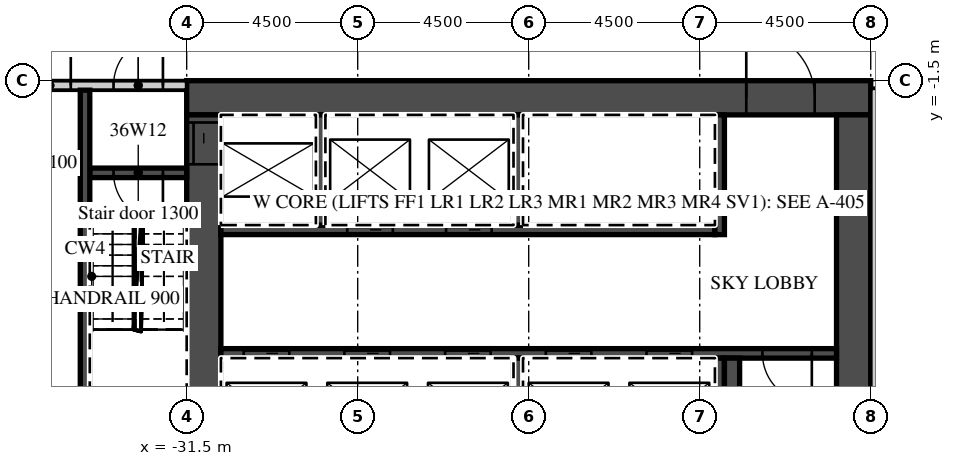
"""IFC4 building model, lengths in metres.
Left out: names, types, materials, properties, quantities, classifications, styles, units other than length and angle.
Written with IfcOpenShell. Run it as: python <this file> out.ifc"""

import sys

from ifc_helpers import new_model, si_unit, direction, frame, frame_2d, origin, place, context, subcontext, project, spatial, rectangle, extrude, element, fill, save


model = new_model("IFC4")
c1 = context("Model", 3, precision=1e-05, world=origin(), true_north=direction((0.0, 1.0)))
c2 = subcontext(c1, "Body", "Model", "MODEL_VIEW")
j1 = project(units=[si_unit("LENGTHUNIT", "METRE"), si_unit("PLANEANGLEUNIT", "RADIAN")], contexts=[c1])
p1 = place(None, origin())
s1 = spatial("IfcSite", under=j1, at=p1, CompositionType="ELEMENT")
p2 = place(p1, origin())
s2 = spatial("IfcBuilding", under=s1, at=p2, CompositionType="ELEMENT")
p3 = place(p2, frame((0.0, 0.0, 155.0)))
s3 = spatial("IfcBuildingStorey", under=s2, at=p3, CompositionType="ELEMENT", Elevation=155.0)
p4 = place(p3, frame((-31.5, -1.95, 0.0), z_axis=(0.0, 0.0, 1.0), x_axis=(1.0, 0.0, 0.0)))
e1 = element("IfcWall", 1, at=p4, inside=s3, PredefinedType="SHEAR", context=c2, shape_type="SweptSolid", body=[
    extrude(rectangle(XDim=18.0, YDim=0.9, at=frame_2d((9.0, 0.0))), origin(), (0.0, 0.0, 1.0), 7.0),
])
p5 = place(p4, frame((14.725, 0.0, 0.0)))
e2 = element("IfcOpeningElement", 2, at=p5, cuts=e1, PredefinedType="OPENING", context=c2, shape_type="SweptSolid", body=[
    extrude(rectangle(XDim=1.8, YDim=2.1, at=frame_2d((0.9, 1.05))), frame((0.0, 0.46, 0.0), z_axis=(0.0, -1.0, 0.0), x_axis=(1.0, 0.0, 0.0)), (0.0, 0.0, 1.0), 0.92),
])
p6 = place(p3, frame((-31.05, -15.2, 0.0), z_axis=(0.0, 0.0, 1.0), x_axis=(0.0, 1.0, 0.0)))
e3 = element("IfcWall", 3, at=p6, inside=s3, PredefinedType="SHEAR", context=c2, shape_type="SweptSolid", body=[
    extrude(rectangle(XDim=12.8, YDim=0.9, at=frame_2d((6.4, 0.0))), origin(), (0.0, 0.0, 1.0), 7.0),
])
p7 = place(p6, frame((11.5, 0.0, 0.0)))
e4 = element("IfcOpeningElement", 4, at=p7, cuts=e3, PredefinedType="OPENING", context=c2, shape_type="SweptSolid", body=[
    extrude(rectangle(XDim=1.1, YDim=2.1, at=frame_2d((0.55, 1.05))), frame((0.0, 0.46, 0.0), z_axis=(0.0, -1.0, 0.0), x_axis=(1.0, 0.0, 0.0)), (0.0, 0.0, 1.0), 0.92),
])
p8 = place(p3, frame((-13.95, -14.6, 0.0), z_axis=(0.0, 0.0, 1.0), x_axis=(0.0, 1.0, 0.0)))
e5 = element("IfcWall", 5, at=p8, inside=s3, PredefinedType="SHEAR", context=c2, shape_type="SweptSolid", body=[
    extrude(rectangle(XDim=12.2, YDim=0.9, at=frame_2d((6.1, 0.0))), origin(), (0.0, 0.0, 1.0), 7.0),
])
p9 = place(p3, frame((-30.6, -5.425, 0.0), z_axis=(0.0, 0.0, 1.0), x_axis=(1.0, 0.0, 0.0)))
e6 = element("IfcWall", 6, at=p9, inside=s3, PredefinedType="SHEAR", context=c2, shape_type="SweptSolid", body=[
    extrude(rectangle(XDim=13.0, YDim=0.25, at=frame_2d((6.5, 0.0))), origin(), (0.0, 0.0, 1.0), 7.0),
])
p10 = place(p9, frame((3.325, 0.0, 0.0)))
e7 = element("IfcOpeningElement", 7, at=p10, cuts=e6, PredefinedType="OPENING", context=c2, shape_type="SweptSolid", body=[
    extrude(rectangle(XDim=1.2, YDim=2.1, at=frame_2d((0.6, 1.05))), frame((0.0, 0.135, 0.0), z_axis=(0.0, -1.0, 0.0), x_axis=(1.0, 0.0, 0.0)), (0.0, 0.0, 1.0), 0.27),
])
p11 = place(p9, frame((5.925, 0.0, 0.0)))
e8 = element("IfcOpeningElement", 8, at=p11, cuts=e6, PredefinedType="OPENING", context=c2, shape_type="SweptSolid", body=[
    extrude(rectangle(XDim=1.2, YDim=2.1, at=frame_2d((0.6, 1.05))), frame((0.0, 0.135, 0.0), z_axis=(0.0, -1.0, 0.0), x_axis=(1.0, 0.0, 0.0)), (0.0, 0.0, 1.0), 0.27),
])
p12 = place(p3, frame((-17.475, -5.55, 0.0), z_axis=(0.0, 0.0, 1.0), x_axis=(0.0, 1.0, 0.0)))
e9 = element("IfcWall", 9, at=p12, inside=s3, PredefinedType="SHEAR", context=c2, shape_type="SweptSolid", body=[
    extrude(rectangle(XDim=3.15, YDim=0.25, at=frame_2d((1.575, 0.0))), origin(), (0.0, 0.0, 1.0), 7.0),
])
for number, where, z_axis, x_axis in (
    (10, (-27.975, -5.3, 0.0), (0.0, 0.0, 1.0), (0.0, 1.0, 0.0)),
    (11, (-22.775, -5.3, 0.0), (0.0, 0.0, 1.0), (0.0, 1.0, 0.0)),
):
    element("IfcWall", number, at=place(p3, frame(where, z_axis=z_axis, x_axis=x_axis)), inside=s3, PredefinedType="SHEAR", context=c2, shape_type="SweptSolid", body=[
        extrude(rectangle(XDim=2.9, YDim=0.25, at=frame_2d((1.45, 0.0))), origin(), (0.0, 0.0, 1.0), 7.0),
    ])
p13 = place(p3, frame((-30.6, -8.675, 0.0), z_axis=(0.0, 0.0, 1.0), x_axis=(1.0, 0.0, 0.0)))
e12 = element("IfcWall", 12, at=p13, inside=s3, PredefinedType="SHEAR", context=c2, shape_type="SweptSolid", body=[
    extrude(rectangle(XDim=16.2, YDim=0.25, at=frame_2d((8.1, 0.0))), origin(), (0.0, 0.0, 1.0), 7.0),
])
p14 = place(p13, frame((0.6, 0.0, 0.0)))
e13 = element("IfcOpeningElement", 13, at=p14, cuts=e12, PredefinedType="OPENING", context=c2, shape_type="SweptSolid", body=[
    extrude(rectangle(XDim=1.2, YDim=2.1, at=frame_2d((0.6, 1.05))), frame((0.0, 0.135, 0.0), z_axis=(0.0, -1.0, 0.0), x_axis=(1.0, 0.0, 0.0)), (0.0, 0.0, 1.0), 0.27),
])
p15 = place(p13, frame((3.25, 0.0, 0.0)))
e14 = element("IfcOpeningElement", 14, at=p15, cuts=e12, PredefinedType="OPENING", context=c2, shape_type="SweptSolid", body=[
    extrude(rectangle(XDim=1.2, YDim=2.1, at=frame_2d((0.6, 1.05))), frame((0.0, 0.135, 0.0), z_axis=(0.0, -1.0, 0.0), x_axis=(1.0, 0.0, 0.0)), (0.0, 0.0, 1.0), 0.27),
])
p16 = place(p13, frame((5.9, 0.0, 0.0)))
e15 = element("IfcOpeningElement", 15, at=p16, cuts=e12, PredefinedType="OPENING", context=c2, shape_type="SweptSolid", body=[
    extrude(rectangle(XDim=1.2, YDim=2.1, at=frame_2d((0.6, 1.05))), frame((0.0, 0.135, 0.0), z_axis=(0.0, -1.0, 0.0), x_axis=(1.0, 0.0, 0.0)), (0.0, 0.0, 1.0), 0.27),
])
p17 = place(p13, frame((8.55, 0.0, 0.0)))
e16 = element("IfcOpeningElement", 16, at=p17, cuts=e12, PredefinedType="OPENING", context=c2, shape_type="SweptSolid", body=[
    extrude(rectangle(XDim=1.2, YDim=2.1, at=frame_2d((0.6, 1.05))), frame((0.0, 0.135, 0.0), z_axis=(0.0, -1.0, 0.0), x_axis=(1.0, 0.0, 0.0)), (0.0, 0.0, 1.0), 0.27),
])
p18 = place(p13, frame((11.2, 0.0, 0.0)))
e17 = element("IfcOpeningElement", 17, at=p18, cuts=e12, PredefinedType="OPENING", context=c2, shape_type="SweptSolid", body=[
    extrude(rectangle(XDim=1.2, YDim=2.1, at=frame_2d((0.6, 1.05))), frame((0.0, 0.135, 0.0), z_axis=(0.0, -1.0, 0.0), x_axis=(1.0, 0.0, 0.0)), (0.0, 0.0, 1.0), 0.27),
])
p19 = place(p13, frame((14.25, 0.0, 0.0)))
e18 = element("IfcOpeningElement", 18, at=p19, cuts=e12, PredefinedType="OPENING", context=c2, shape_type="SweptSolid", body=[
    extrude(rectangle(XDim=1.3, YDim=2.1, at=frame_2d((0.65, 1.05))), frame((0.0, 0.135, 0.0), z_axis=(0.0, -1.0, 0.0), x_axis=(1.0, 0.0, 0.0)), (0.0, 0.0, 1.0), 0.27),
])
for number, where, z_axis, x_axis in (
    (19, (-17.475, -11.7, 0.0), (0.0, 0.0, 1.0), (0.0, 1.0, 0.0)),
    (20, (-22.775, -11.7, 0.0), (0.0, 0.0, 1.0), (0.0, 1.0, 0.0)),
):
    element("IfcWall", number, at=place(p3, frame(where, z_axis=z_axis, x_axis=x_axis)), inside=s3, PredefinedType="SHEAR", context=c2, shape_type="SweptSolid", body=[
        extrude(rectangle(XDim=2.9, YDim=0.25, at=frame_2d((1.45, 0.0))), origin(), (0.0, 0.0, 1.0), 7.0),
    ])
p20 = place(p3, frame((-17.15, -14.6, 0.0), z_axis=(0.0, 0.0, 1.0), x_axis=(0.0, 1.0, 0.0)))
e21 = element("IfcWall", 21, at=p20, inside=s3, PredefinedType="SHEAR", context=c2, shape_type="SweptSolid", body=[
    extrude(rectangle(XDim=5.8, YDim=0.4, at=frame_2d((2.9, 0.0))), origin(), (0.0, 0.0, 1.0), 7.0),
])
p21 = place(p3, frame((-42.933, -1.625, 0.0), z_axis=(0.0, 0.0, 1.0), x_axis=(1.0, 0.0, 0.0)))
e22 = element("IfcWall", 22, at=p21, inside=s3, PredefinedType="PARTITIONING", context=c2, shape_type="SweptSolid", body=[
    extrude(rectangle(XDim=11.433, YDim=0.25, at=frame_2d((5.716, 0.0))), origin(), (0.0, 0.0, 1.0), 7.0),
])
p22 = place(p21, frame((9.508, 0.0, 0.0)))
e23 = element("IfcOpeningElement", 23, at=p22, cuts=e22, PredefinedType="OPENING", context=c2, shape_type="SweptSolid", body=[
    extrude(rectangle(XDim=1.3, YDim=2.1, at=frame_2d((0.65, 1.05))), frame((0.0, 0.135, 0.0), z_axis=(0.0, -1.0, 0.0), x_axis=(1.0, 0.0, 0.0)), (0.0, 0.0, 1.0), 0.27),
])
p23 = place(p21, frame((7.283, 0.0, 0.0)))
e24 = element("IfcOpeningElement", 24, at=p23, cuts=e22, PredefinedType="OPENING", context=c2, shape_type="SweptSolid", body=[
    extrude(rectangle(XDim=1.1, YDim=2.1, at=frame_2d((0.55, 1.05))), frame((0.0, 0.135, 0.0), z_axis=(0.0, -1.0, 0.0), x_axis=(1.0, 0.0, 0.0)), (0.0, 0.0, 1.0), 0.27),
])
p24 = place(p3, frame((-34.05, -3.925, 0.0), z_axis=(0.0, 0.0, 1.0), x_axis=(1.0, 0.0, 0.0)))
e25 = element("IfcWall", 25, at=p24, inside=s3, PredefinedType="SHEAR", context=c2, shape_type="SweptSolid", body=[
    extrude(rectangle(XDim=2.55, YDim=0.25, at=frame_2d((1.275, 0.0))), origin(), (0.0, 0.0, 1.0), 7.0),
])
p25 = place(p24, frame((0.625, 0.0, 0.0)))
e26 = element("IfcOpeningElement", 26, at=p25, cuts=e25, PredefinedType="OPENING", context=c2, shape_type="SweptSolid", body=[
    extrude(rectangle(XDim=1.3, YDim=2.1, at=frame_2d((0.65, 1.05))), frame((0.0, 0.135, 0.0), z_axis=(0.0, -1.0, 0.0), x_axis=(1.0, 0.0, 0.0)), (0.0, 0.0, 1.0), 0.27),
])
p26 = place(p3, frame((-34.175, -10.1, 0.0), z_axis=(0.0, 0.0, 1.0), x_axis=(0.0, 1.0, 0.0)))
e27 = element("IfcWall", 27, at=p26, inside=s3, PredefinedType="SHEAR", context=c2, shape_type="SweptSolid", body=[
    extrude(rectangle(XDim=8.35, YDim=0.25, at=frame_2d((4.175, 0.0))), origin(), (0.0, 0.0, 1.0), 7.0),
])
p27 = place(p3, frame((-13.4, -22.592, 0.0), z_axis=(0.0, 0.0, 1.0), x_axis=(0.0, 1.0, 0.0)))
e28 = element("IfcWall", 28, at=p27, inside=s3, PredefinedType="PARTITIONING", context=c2, shape_type="SweptSolid", body=[
    extrude(rectangle(XDim=20.892, YDim=0.2, at=frame_2d((10.446, 0.0))), origin(), (0.0, 0.0, 1.0), 7.0),
])
p28 = place(p14, origin())
e29 = element("IfcDoor", 29, at=p28, inside=s3, OperationType="SLIDING_TO_LEFT", PredefinedType="DOOR", context=c2, shape_type="SweptSolid", body=[
    extrude(rectangle(XDim=1.2, YDim=2.1, at=frame_2d((0.6, 1.05))), frame((0.0, 0.025, 0.0), z_axis=(0.0, -1.0, 0.0), x_axis=(1.0, 0.0, 0.0)), (0.0, 0.0, 1.0), 0.05),
])
fill(e13, e29)
p29 = place(p15, origin())
e30 = element("IfcDoor", 30, at=p29, inside=s3, OperationType="SLIDING_TO_RIGHT", PredefinedType="DOOR", context=c2, shape_type="SweptSolid", body=[
    extrude(rectangle(XDim=1.2, YDim=2.1, at=frame_2d((0.6, 1.05))), frame((0.0, 0.025, 0.0), z_axis=(0.0, -1.0, 0.0), x_axis=(1.0, 0.0, 0.0)), (0.0, 0.0, 1.0), 0.05),
])
fill(e14, e30)
p30 = place(p16, origin())
e31 = element("IfcDoor", 31, at=p30, inside=s3, OperationType="SLIDING_TO_RIGHT", PredefinedType="DOOR", context=c2, shape_type="SweptSolid", body=[
    extrude(rectangle(XDim=1.2, YDim=2.1, at=frame_2d((0.6, 1.05))), frame((0.0, 0.025, 0.0), z_axis=(0.0, -1.0, 0.0), x_axis=(1.0, 0.0, 0.0)), (0.0, 0.0, 1.0), 0.05),
])
fill(e15, e31)
p31 = place(p17, origin())
e32 = element("IfcDoor", 32, at=p31, inside=s3, OperationType="SLIDING_TO_LEFT", PredefinedType="DOOR", context=c2, shape_type="SweptSolid", body=[
    extrude(rectangle(XDim=1.2, YDim=2.1, at=frame_2d((0.6, 1.05))), frame((0.0, 0.025, 0.0), z_axis=(0.0, -1.0, 0.0), x_axis=(1.0, 0.0, 0.0)), (0.0, 0.0, 1.0), 0.05),
])
fill(e16, e32)
p32 = place(p18, origin())
e33 = element("IfcDoor", 33, at=p32, inside=s3, OperationType="SLIDING_TO_RIGHT", PredefinedType="DOOR", context=c2, shape_type="SweptSolid", body=[
    extrude(rectangle(XDim=1.2, YDim=2.1, at=frame_2d((0.6, 1.05))), frame((0.0, 0.025, 0.0), z_axis=(0.0, -1.0, 0.0), x_axis=(1.0, 0.0, 0.0)), (0.0, 0.0, 1.0), 0.05),
])
fill(e17, e33)
p33 = place(p10, origin())
e34 = element("IfcDoor", 34, at=p33, inside=s3, OperationType="SLIDING_TO_RIGHT", PredefinedType="DOOR", context=c2, shape_type="SweptSolid", body=[
    extrude(rectangle(XDim=1.2, YDim=2.1, at=frame_2d((0.6, 1.05))), frame((0.0, 0.025, 0.0), z_axis=(0.0, -1.0, 0.0), x_axis=(1.0, 0.0, 0.0)), (0.0, 0.0, 1.0), 0.05),
])
fill(e7, e34)
p34 = place(p11, origin())
e35 = element("IfcDoor", 35, at=p34, inside=s3, OperationType="SLIDING_TO_RIGHT", PredefinedType="DOOR", context=c2, shape_type="SweptSolid", body=[
    extrude(rectangle(XDim=1.2, YDim=2.1, at=frame_2d((0.6, 1.05))), frame((0.0, 0.025, 0.0), z_axis=(0.0, -1.0, 0.0), x_axis=(1.0, 0.0, 0.0)), (0.0, 0.0, 1.0), 0.05),
])
fill(e8, e35)
p35 = place(p7, origin())
e36 = element("IfcDoor", 36, at=p35, inside=s3, OperationType="SLIDING_TO_RIGHT", PredefinedType="DOOR", context=c2, shape_type="SweptSolid", body=[
    extrude(rectangle(XDim=1.1, YDim=2.1, at=frame_2d((0.55, 1.05))), frame((0.0, 0.025, 0.0), z_axis=(0.0, -1.0, 0.0), x_axis=(1.0, 0.0, 0.0)), (0.0, 0.0, 1.0), 0.05),
])
fill(e4, e36)
p36 = place(p5, origin())
e37 = element("IfcDoor", 37, at=p36, inside=s3, OperationType="DOUBLE_DOOR_DOUBLE_SWING", PredefinedType="DOOR", context=c2, shape_type="SweptSolid", body=[
    extrude(rectangle(XDim=1.8, YDim=2.1, at=frame_2d((0.9, 1.05))), frame((0.0, 0.025, 0.0), z_axis=(0.0, -1.0, 0.0), x_axis=(1.0, 0.0, 0.0)), (0.0, 0.0, 1.0), 0.05),
])
fill(e2, e37)
p37 = place(p22, origin())
e38 = element("IfcDoor", 38, at=p37, inside=s3, OperationType="SINGLE_SWING_RIGHT", PredefinedType="DOOR", context=c2, shape_type="SweptSolid", body=[
    extrude(rectangle(XDim=1.3, YDim=2.1, at=frame_2d((0.65, 1.05))), frame((0.0, 0.025, 0.0), z_axis=(0.0, -1.0, 0.0), x_axis=(1.0, 0.0, 0.0)), (0.0, 0.0, 1.0), 0.05),
])
fill(e23, e38)
p38 = place(p25, origin())
e39 = element("IfcDoor", 39, at=p38, inside=s3, OperationType="SINGLE_SWING_RIGHT", PredefinedType="DOOR", context=c2, shape_type="SweptSolid", body=[
    extrude(rectangle(XDim=1.3, YDim=2.1, at=frame_2d((0.65, 1.05))), frame((0.0, 0.025, 0.0), z_axis=(0.0, -1.0, 0.0), x_axis=(1.0, 0.0, 0.0)), (0.0, 0.0, 1.0), 0.05),
])
fill(e26, e39)
p39 = place(p23, origin())
e40 = element("IfcDoor", 40, at=p39, inside=s3, OperationType="SINGLE_SWING_RIGHT", PredefinedType="DOOR", context=c2, shape_type="SweptSolid", body=[
    extrude(rectangle(XDim=1.1, YDim=2.1, at=frame_2d((0.55, 1.05))), frame((0.0, 0.025, 0.0), z_axis=(0.0, -1.0, 0.0), x_axis=(1.0, 0.0, 0.0)), (0.0, 0.0, 1.0), 0.05),
])
fill(e24, e40)
p40 = place(p19, origin())
e41 = element("IfcDoor", 41, at=p40, inside=s3, OperationType="SINGLE_SWING_RIGHT", PredefinedType="DOOR", context=c2, shape_type="SweptSolid", body=[
    extrude(rectangle(XDim=1.3, YDim=2.1, at=frame_2d((0.65, 1.05))), frame((0.0, 0.025, 0.0), z_axis=(0.0, -1.0, 0.0), x_axis=(1.0, 0.0, 0.0)), (0.0, 0.0, 1.0), 0.05),
])
fill(e18, e41)
save(model, sys.argv[1])
